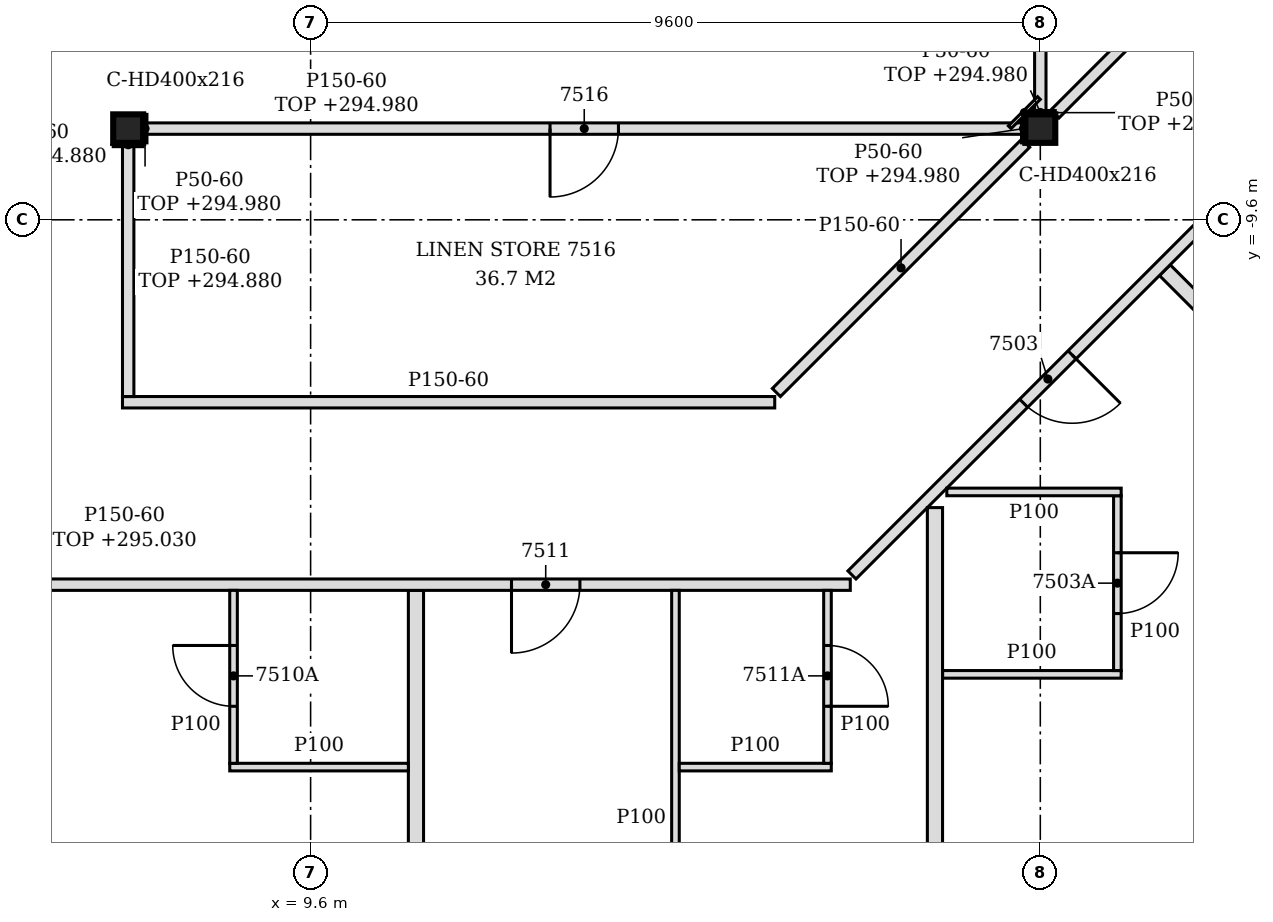
"""IFC4 building model, lengths in metres.
Left out: names, types, materials, properties, quantities, classifications, styles, units other than length and angle.
Written with IfcOpenShell. Run it as: python <this file> out.ifc"""

import sys

from ifc_helpers import new_model, si_unit, direction, frame, frame_2d, origin, origin_2d, place, context, subcontext, project, spatial, polyline, rectangle, i_section, outline, extrude, element, fill, save


model = new_model("IFC4")
c1 = context("Model", 3, precision=1e-05, world=origin(), true_north=direction((0.0, 1.0)))
c2 = subcontext(c1, "Body", "Model", "MODEL_VIEW")
j1 = project(units=[si_unit("LENGTHUNIT", "METRE"), si_unit("PLANEANGLEUNIT", "RADIAN")], contexts=[c1])
p1 = place(None, origin())
s1 = spatial("IfcSite", under=j1, at=p1, CompositionType="ELEMENT")
p2 = place(p1, origin())
s2 = spatial("IfcBuilding", under=s1, at=p2, CompositionType="ELEMENT")
p3 = place(p2, frame((0.0, 0.0, 292.2)))
s3 = spatial("IfcBuildingStorey", under=s2, at=p3, CompositionType="ELEMENT", Elevation=292.2)
for number, where, z_axis, x_axis in (
    (1, (7.2, -8.4, -0.15), (0.0, 0.0, 1.0), (1.0, 0.0, 0.0)),
    (2, (19.2, -8.4, -0.15), (0.0, 0.0, 1.0), (1.0, 0.0, 0.0)),
):
    element("IfcColumn", number, at=place(p3, frame(where, z_axis=z_axis, x_axis=x_axis)), inside=s3, PredefinedType="COLUMN", context=c2, shape_type="SweptSolid", body=[
        extrude(i_section(OverallWidth=0.394, OverallDepth=0.375, WebThickness=0.017, FlangeThickness=0.028, FilletRadius=0.015, at=origin_2d()), origin(), (0.0, 0.0, 1.0), 3.55),
    ])
p4 = place(p3, frame((10.986, -23.703, 0.0), z_axis=(0.0, 0.0, 1.0), x_axis=(0.0, 1.0, 0.0)))
e3 = element("IfcWall", 3, at=p4, inside=s3, PredefinedType="PARTITIONING", context=c2, shape_type="SweptSolid", body=[
    extrude(outline(polyline([(0.0, 0.0), (9.228, 0.0), (9.228, 2.83), (9.198, 2.83), (9.196, 3.4), (4.608, 3.4), (4.606, 2.83), (4.398, 2.83), (4.396, 3.4), (0.753, 3.4), (0.751, 2.88), (0.453, 2.88), (0.451, 3.4), (0.0, 3.4), (0.0, 0.0)])), frame((0.0, 0.1, 0.0), z_axis=(0.0, -1.0, 0.0), x_axis=(1.0, 0.0, 0.0)), (0.0, 0.0, 1.0), 0.2),
])
p5 = place(p3, frame((17.814, -23.703, 0.0), z_axis=(0.0, 0.0, 1.0), x_axis=(0.0, 1.0, 0.0)))
e4 = element("IfcWall", 4, at=p5, inside=s3, PredefinedType="PARTITIONING", context=c2, shape_type="SweptSolid", body=[
    extrude(outline(polyline([(0.0, 0.0), (10.317, 0.0), (10.317, 3.4), (9.408, 3.4), (9.406, 2.83), (9.198, 2.83), (9.196, 3.4), (4.608, 3.4), (4.606, 2.83), (4.398, 2.83), (4.396, 3.4), (0.753, 3.4), (0.751, 2.88), (0.453, 2.88), (0.451, 3.4), (0.0, 3.4), (0.0, 0.0)])), frame((0.0, 0.1, 0.0), z_axis=(0.0, -1.0, 0.0), x_axis=(1.0, 0.0, 0.0)), (0.0, 0.0, 1.0), 0.2),
])
p6 = place(p3, frame((14.4, -22.916, 0.0), z_axis=(0.0, 0.0, 1.0), x_axis=(0.0, 1.0, 0.0)))
e5 = element("IfcWall", 5, at=p6, inside=s3, PredefinedType="PARTITIONING", context=c2, shape_type="SweptSolid", body=[
    extrude(outline(polyline([(0.0, 0.0), (8.441, 0.0), (8.441, 2.83), (8.411, 2.83), (8.409, 3.4), (3.821, 3.4), (3.819, 2.83), (3.611, 2.83), (3.609, 3.4), (0.0, 3.4), (0.0, 0.0)])), frame((0.0, 0.05, 0.0), z_axis=(0.0, -1.0, 0.0), x_axis=(1.0, 0.0, 0.0)), (0.0, 0.0, 1.0), 0.1),
])
p7 = place(p6, frame((2.066, 0.0, 0.0)))
e6 = element("IfcOpeningElement", 6, at=p7, cuts=e5, PredefinedType="OPENING", context=c2, shape_type="SweptSolid", body=[
    extrude(rectangle(XDim=0.9, YDim=2.1, at=frame_2d((0.45, 1.05))), frame((0.0, 0.06, 0.0), z_axis=(0.0, -1.0, 0.0), x_axis=(1.0, 0.0, 0.0)), (0.0, 0.0, 1.0), 0.12),
])
p8 = place(p3, frame((8.536, -16.8, 0.0), z_axis=(0.0, 0.0, 1.0), x_axis=(1.0, 0.0, 0.0)))
e7 = element("IfcWall", 7, at=p8, inside=s3, PredefinedType="PARTITIONING", context=c2, shape_type="SweptSolid", body=[
    extrude(rectangle(XDim=2.35, YDim=0.1, at=frame_2d((1.175, 0.0))), origin(), (0.0, 0.0, 1.0), 3.4),
])
p9 = place(p3, frame((8.586, -16.75, 0.0), z_axis=(0.0, 0.0, 1.0), x_axis=(0.0, 1.0, 0.0)))
e8 = element("IfcWall", 8, at=p9, inside=s3, PredefinedType="PARTITIONING", context=c2, shape_type="SweptSolid", body=[
    extrude(outline(polyline([(0.0, 0.0), (2.275, 0.0), (2.275, 2.83), (2.245, 2.83), (2.243, 3.4), (0.0, 3.4), (0.0, 0.0)])), frame((0.0, 0.05, 0.0), z_axis=(0.0, -1.0, 0.0), x_axis=(1.0, 0.0, 0.0)), (0.0, 0.0, 1.0), 0.1),
])
p10 = place(p9, frame((0.75, 0.0, 0.0)))
e9 = element("IfcOpeningElement", 9, at=p10, cuts=e8, PredefinedType="OPENING", context=c2, shape_type="SweptSolid", body=[
    extrude(rectangle(XDim=0.8, YDim=2.1, at=frame_2d((0.4, 1.05))), frame((0.0, 0.06, 0.0), z_axis=(0.0, -1.0, 0.0), x_axis=(1.0, 0.0, 0.0)), (0.0, 0.0, 1.0), 0.12),
])
p11 = place(p3, frame((14.45, -16.8, 0.0), z_axis=(0.0, 0.0, 1.0), x_axis=(1.0, 0.0, 0.0)))
e10 = element("IfcWall", 10, at=p11, inside=s3, PredefinedType="PARTITIONING", context=c2, shape_type="SweptSolid", body=[
    extrude(rectangle(XDim=2.0, YDim=0.1, at=frame_2d((1.0, 0.0))), origin(), (0.0, 0.0, 1.0), 3.4),
])
p12 = place(p3, frame((16.4, -16.75, 0.0), z_axis=(0.0, 0.0, 1.0), x_axis=(0.0, 1.0, 0.0)))
e11 = element("IfcWall", 11, at=p12, inside=s3, PredefinedType="PARTITIONING", context=c2, shape_type="SweptSolid", body=[
    extrude(outline(polyline([(0.0, 0.0), (2.275, 0.0), (2.275, 2.83), (2.245, 2.83), (2.243, 3.4), (0.0, 3.4), (0.0, 0.0)])), frame((0.0, 0.05, 0.0), z_axis=(0.0, -1.0, 0.0), x_axis=(1.0, 0.0, 0.0)), (0.0, 0.0, 1.0), 0.1),
])
p13 = place(p12, frame((0.75, 0.0, 0.0)))
e12 = element("IfcOpeningElement", 12, at=p13, cuts=e11, PredefinedType="OPENING", context=c2, shape_type="SweptSolid", body=[
    extrude(rectangle(XDim=0.8, YDim=2.1, at=frame_2d((0.4, 1.05))), frame((0.0, 0.06, 0.0), z_axis=(0.0, -1.0, 0.0), x_axis=(1.0, 0.0, 0.0)), (0.0, 0.0, 1.0), 0.12),
])
p14 = place(p3, frame((27.262, -16.686, 0.0), z_axis=(0.0, 0.0, 1.0), x_axis=(-0.707106781187, 0.707106781187, 0.0)))
e13 = element("IfcWall", 13, at=p14, inside=s3, PredefinedType="PARTITIONING", context=c2, shape_type="SweptSolid", body=[
    extrude(rectangle(XDim=9.085, YDim=0.2, at=frame_2d((4.542, 0.0))), origin(), (0.0, 0.0, 1.0), 2.88),
])
p15 = place(p3, frame((17.914, -15.58, 0.0), z_axis=(0.0, 0.0, 1.0), x_axis=(1.0, 0.0, 0.0)))
e14 = element("IfcWall", 14, at=p15, inside=s3, PredefinedType="PARTITIONING", context=c2, shape_type="SweptSolid", body=[
    extrude(outline(polyline([(0.0, 0.0), (2.35, 0.0), (2.35, 3.4), (1.436, 3.4), (1.434, 2.68), (1.136, 2.68), (1.134, 3.4), (0.0, 3.4), (0.0, 0.0)])), frame((0.0, 0.05, 0.0), z_axis=(0.0, -1.0, 0.0), x_axis=(1.0, 0.0, 0.0)), (0.0, 0.0, 1.0), 0.1),
])
p16 = place(p3, frame((20.214, -15.53, 0.0), z_axis=(0.0, 0.0, 1.0), x_axis=(0.0, 1.0, 0.0)))
e15 = element("IfcWall", 15, at=p16, inside=s3, PredefinedType="PARTITIONING", context=c2, shape_type="SweptSolid", body=[
    extrude(outline(polyline([(0.0, 0.0), (2.3, 0.0), (2.3, 3.4), (1.23, 3.4), (1.228, 2.88), (1.03, 2.88), (1.028, 3.4), (0.0, 3.4), (0.0, 0.0)])), frame((0.0, 0.05, 0.0), z_axis=(0.0, -1.0, 0.0), x_axis=(1.0, 0.0, 0.0)), (0.0, 0.0, 1.0), 0.1),
])
p17 = place(p16, frame((0.75, 0.0, 0.0)))
e16 = element("IfcOpeningElement", 16, at=p17, cuts=e15, PredefinedType="OPENING", context=c2, shape_type="SweptSolid", body=[
    extrude(rectangle(XDim=0.8, YDim=2.1, at=frame_2d((0.4, 1.05))), frame((0.0, 0.06, 0.0), z_axis=(0.0, -1.0, 0.0), x_axis=(1.0, 0.0, 0.0)), (0.0, 0.0, 1.0), 0.12),
])
p18 = place(p3, frame((-1.926, -14.4, 0.0), z_axis=(0.0, 0.0, 1.0), x_axis=(1.0, 0.0, 0.0)))
e17 = element("IfcWall", 17, at=p18, inside=s3, PredefinedType="PARTITIONING", context=c2, shape_type="SweptSolid", body=[
    extrude(outline(polyline([(0.0, 0.0), (18.626, 0.0), (18.626, 2.83), (9.276, 2.83), (9.274, 2.68), (8.976, 2.68), (8.974, 2.83), (1.369, 2.83), (1.367, 2.58), (0.229, 2.58), (0.227, 2.83), (0.0, 2.83), (0.0, 0.0)])), frame((0.0, 0.075, 0.0), z_axis=(0.0, -1.0, 0.0), x_axis=(1.0, 0.0, 0.0)), (0.0, 0.0, 1.0), 0.15),
])
p19 = place(p18, frame((4.569, 0.0, 0.0)))
e18 = element("IfcOpeningElement", 18, at=p19, cuts=e17, PredefinedType="OPENING", context=c2, shape_type="SweptSolid", body=[
    extrude(rectangle(XDim=0.9, YDim=2.1, at=frame_2d((0.45, 1.05))), frame((0.0, 0.085, 0.0), z_axis=(0.0, -1.0, 0.0), x_axis=(1.0, 0.0, 0.0)), (0.0, 0.0, 1.0), 0.17),
])
p20 = place(p18, frame((14.169, 0.0, 0.0)))
e19 = element("IfcOpeningElement", 19, at=p20, cuts=e17, PredefinedType="OPENING", context=c2, shape_type="SweptSolid", body=[
    extrude(rectangle(XDim=0.9, YDim=2.1, at=frame_2d((0.45, 1.05))), frame((0.0, 0.085, 0.0), z_axis=(0.0, -1.0, 0.0), x_axis=(1.0, 0.0, 0.0)), (0.0, 0.0, 1.0), 0.17),
])
p21 = place(p3, frame((16.722, -14.272, 0.0), z_axis=(0.0, 0.0, 1.0), x_axis=(0.707106781187, 0.707106781187, 0.0)))
e20 = element("IfcWall", 20, at=p21, inside=s3, PredefinedType="PARTITIONING", context=c2, shape_type="SweptSolid", body=[
    extrude(rectangle(XDim=20.058, YDim=0.15, at=frame_2d((10.029, 0.0))), origin(), (0.0, 0.0, 1.0), 2.68),
])
p22 = place(p21, frame((3.195, 0.0, 0.0)))
e21 = element("IfcOpeningElement", 21, at=p22, cuts=e20, PredefinedType="OPENING", context=c2, shape_type="SweptSolid", body=[
    extrude(rectangle(XDim=0.9, YDim=2.1, at=frame_2d((0.45, 1.05))), frame((0.0, 0.085, 0.0), z_axis=(0.0, -1.0, 0.0), x_axis=(1.0, 0.0, 0.0)), (0.0, 0.0, 1.0), 0.17),
])
p23 = place(p21, frame((9.193, 0.0, 0.0)))
e22 = element("IfcOpeningElement", 22, at=p23, cuts=e20, PredefinedType="OPENING", context=c2, shape_type="SweptSolid", body=[
    extrude(rectangle(XDim=0.9, YDim=2.1, at=frame_2d((0.45, 1.05))), frame((0.0, 0.085, 0.0), z_axis=(0.0, -1.0, 0.0), x_axis=(1.0, 0.0, 0.0)), (0.0, 0.0, 1.0), 0.17),
])
p24 = place(p21, frame((17.613, 0.0, 0.0)))
e23 = element("IfcOpeningElement", 23, at=p24, cuts=e20, PredefinedType="OPENING", context=c2, shape_type="SweptSolid", body=[
    extrude(rectangle(XDim=0.9, YDim=2.1, at=frame_2d((0.45, 1.05))), frame((0.0, 0.085, 0.0), z_axis=(0.0, -1.0, 0.0), x_axis=(1.0, 0.0, 0.0)), (0.0, 0.0, 1.0), 0.17),
])
p25 = place(p3, frame((17.97, -13.18, 0.0), z_axis=(0.0, 0.0, 1.0), x_axis=(1.0, 0.0, 0.0)))
e24 = element("IfcWall", 24, at=p25, inside=s3, PredefinedType="PARTITIONING", context=c2, shape_type="SweptSolid", body=[
    extrude(outline(polyline([(0.0, 0.0), (2.294, 0.0), (2.294, 3.4), (1.38, 3.4), (1.378, 2.68), (1.08, 2.68), (1.078, 3.4), (0.0, 3.4), (0.0, 0.0)])), frame((0.0, 0.05, 0.0), z_axis=(0.0, -1.0, 0.0), x_axis=(1.0, 0.0, 0.0)), (0.0, 0.0, 1.0), 0.1),
])
p26 = place(p3, frame((7.125, -12.0, 0.0), z_axis=(0.0, 0.0, 1.0), x_axis=(1.0, 0.0, 0.0)))
e25 = element("IfcWall", 25, at=p26, inside=s3, PredefinedType="PARTITIONING", context=c2, shape_type="SweptSolid", body=[
    extrude(outline(polyline([(0.0, 0.0), (8.581, 0.0), (8.581, 3.4), (0.225, 3.4), (0.223, 2.68), (0.0, 2.68), (0.0, 0.0)])), frame((0.0, 0.075, 0.0), z_axis=(0.0, -1.0, 0.0), x_axis=(1.0, 0.0, 0.0)), (0.0, 0.0, 1.0), 0.15),
])
p27 = place(p3, frame((7.2, -11.925, 0.0), z_axis=(0.0, 0.0, 1.0), x_axis=(0.0, 1.0, 0.0)))
e26 = element("IfcWall", 26, at=p27, inside=s3, PredefinedType="PARTITIONING", context=c2, shape_type="SweptSolid", body=[
    extrude(rectangle(XDim=3.338, YDim=0.15, at=frame_2d((1.669, 0.0))), origin(), (0.0, 0.0, 1.0), 2.68),
])
p28 = place(p3, frame((15.728, -11.872, 0.0), z_axis=(0.0, 0.0, 1.0), x_axis=(0.707106781187, 0.707106781187, 0.0)))
e27 = element("IfcWall", 27, at=p28, inside=s3, PredefinedType="PARTITIONING", context=c2, shape_type="SweptSolid", body=[
    extrude(rectangle(XDim=4.638, YDim=0.15, at=frame_2d((2.319, 0.0))), origin(), (0.0, 0.0, 1.0), 3.4),
])
p29 = place(p3, frame((7.397, -8.4, 0.0), z_axis=(0.0, 0.0, 1.0), x_axis=(1.0, 0.0, 0.0)))
e28 = element("IfcWall", 28, at=p29, inside=s3, PredefinedType="PARTITIONING", context=c2, shape_type="SweptSolid", body=[
    extrude(rectangle(XDim=11.606, YDim=0.15, at=frame_2d((5.803, 0.0))), origin(), (0.0, 0.0, 1.0), 2.78),
])
p30 = place(p29, frame((5.353, 0.0, 0.0)))
e29 = element("IfcOpeningElement", 29, at=p30, cuts=e28, PredefinedType="OPENING", context=c2, shape_type="SweptSolid", body=[
    extrude(rectangle(XDim=0.9, YDim=2.1, at=frame_2d((0.45, 1.05))), frame((0.0, 0.085, 0.0), z_axis=(0.0, -1.0, 0.0), x_axis=(1.0, 0.0, 0.0)), (0.0, 0.0, 1.0), 0.17),
])
p31 = place(p3, frame((19.2, -8.212, 0.0), z_axis=(0.0, 0.0, 1.0), x_axis=(0.0, 1.0, 0.0)))
e30 = element("IfcWall", 30, at=p31, inside=s3, PredefinedType="PARTITIONING", context=c2, shape_type="SweptSolid", body=[
    extrude(rectangle(XDim=9.337, YDim=0.15, at=frame_2d((4.669, 0.0))), origin(), (0.0, 0.0, 1.0), 2.78),
])
p32 = place(p31, frame((7.213, 0.0, 0.0)))
e31 = element("IfcOpeningElement", 31, at=p32, cuts=e30, PredefinedType="OPENING", context=c2, shape_type="SweptSolid", body=[
    extrude(rectangle(XDim=0.8, YDim=2.1, at=frame_2d((0.4, 1.05))), frame((0.0, 0.085, 0.0), z_axis=(0.0, -1.0, 0.0), x_axis=(1.0, 0.0, 0.0)), (0.0, 0.0, 1.0), 0.17),
])
p33 = place(p3, frame((19.392, -8.208, 0.0), z_axis=(0.0, 0.0, 1.0), x_axis=(0.707106781187, 0.707106781187, 0.0)))
e32 = element("IfcWall", 32, at=p33, inside=s3, PredefinedType="PARTITIONING", context=c2, shape_type="SweptSolid", body=[
    extrude(rectangle(XDim=13.124, YDim=0.15, at=frame_2d((6.562, 0.0))), origin(), (0.0, 0.0, 1.0), 2.83),
])
p34 = place(p33, frame((6.066, 0.0, 0.0)))
e33 = element("IfcOpeningElement", 33, at=p34, cuts=e32, PredefinedType="OPENING", context=c2, shape_type="SweptSolid", body=[
    extrude(rectangle(XDim=0.9, YDim=2.1, at=frame_2d((0.45, 1.05))), frame((0.0, 0.085, 0.0), z_axis=(0.0, -1.0, 0.0), x_axis=(1.0, 0.0, 0.0)), (0.0, 0.0, 1.0), 0.17),
])
p35 = place(p3, frame((7.422, -8.587, 0.0), z_axis=(0.0, 0.0, 1.0), x_axis=(0.0, 1.0, 0.0)))
e34 = element("IfcWall", 34, at=p35, inside=s3, PredefinedType="PARTITIONING", context=c2, shape_type="SweptSolid", body=[
    extrude(rectangle(XDim=0.375, YDim=0.05, at=frame_2d((0.188, 0.0))), origin(), (0.0, 0.0, 1.0), 2.78),
])
p36 = place(p3, frame((18.798, -8.382, 0.0), z_axis=(0.0, 0.0, 1.0), x_axis=(0.707106781187, 0.707106781187, 0.0)))
e35 = element("IfcWall", 35, at=p36, inside=s3, PredefinedType="PARTITIONING", context=c2, shape_type="SweptSolid", body=[
    extrude(rectangle(XDim=0.544, YDim=0.05, at=frame_2d((0.272, 0.0))), origin(), (0.0, 0.0, 1.0), 2.78),
])
p37 = place(p3, frame((7.003, -8.613, 0.0), z_axis=(0.0, 0.0, 1.0), x_axis=(1.0, 0.0, 0.0)))
e36 = element("IfcWall", 36, at=p37, inside=s3, PredefinedType="PARTITIONING", context=c2, shape_type="SweptSolid", body=[
    extrude(rectangle(XDim=0.394, YDim=0.05, at=frame_2d((0.197, 0.0))), origin(), (0.0, 0.0, 1.0), 2.68),
])
p38 = place(p3, frame((19.003, -8.188, 0.0), z_axis=(0.0, 0.0, 1.0), x_axis=(1.0, 0.0, 0.0)))
e37 = element("IfcWall", 37, at=p38, inside=s3, PredefinedType="PARTITIONING", context=c2, shape_type="SweptSolid", body=[
    extrude(rectangle(XDim=0.394, YDim=0.05, at=frame_2d((0.197, 0.0))), origin(), (0.0, 0.0, 1.0), 2.78),
])
p39 = place(p3, frame((18.978, -8.587, 0.0), z_axis=(0.0, 0.0, 1.0), x_axis=(0.0, 1.0, 0.0)))
e38 = element("IfcWall", 38, at=p39, inside=s3, PredefinedType="PARTITIONING", context=c2, shape_type="SweptSolid", body=[
    extrude(rectangle(XDim=0.375, YDim=0.05, at=frame_2d((0.188, 0.0))), origin(), (0.0, 0.0, 1.0), 2.78),
])
p40 = place(p22, frame((0.9, 0.0, 0.0), z_axis=(0.0, 0.0, 1.0), x_axis=(-1.0, 0.0, 0.0)))
e39 = element("IfcDoor", 39, at=p40, inside=s3, OperationType="SINGLE_SWING_LEFT", PredefinedType="DOOR", context=c2, shape_type="SweptSolid", body=[
    extrude(rectangle(XDim=0.9, YDim=2.1, at=frame_2d((0.45, 1.05))), frame((0.0, 0.025, 0.0), z_axis=(0.0, -1.0, 0.0), x_axis=(1.0, 0.0, 0.0)), (0.0, 0.0, 1.0), 0.05),
])
fill(e21, e39)
p41 = place(p17, frame((0.8, 0.0, 0.0), z_axis=(0.0, 0.0, 1.0), x_axis=(-1.0, 0.0, 0.0)))
e40 = element("IfcDoor", 40, at=p41, inside=s3, OperationType="SINGLE_SWING_LEFT", PredefinedType="DOOR", context=c2, shape_type="SweptSolid", body=[
    extrude(rectangle(XDim=0.8, YDim=2.1, at=frame_2d((0.4, 1.05))), frame((0.0, 0.025, 0.0), z_axis=(0.0, -1.0, 0.0), x_axis=(1.0, 0.0, 0.0)), (0.0, 0.0, 1.0), 0.05),
])
fill(e16, e40)
p42 = place(p10, origin())
e41 = element("IfcDoor", 41, at=p42, inside=s3, OperationType="SINGLE_SWING_RIGHT", PredefinedType="DOOR", context=c2, shape_type="SweptSolid", body=[
    extrude(rectangle(XDim=0.8, YDim=2.1, at=frame_2d((0.4, 1.05))), frame((0.0, 0.025, 0.0), z_axis=(0.0, -1.0, 0.0), x_axis=(1.0, 0.0, 0.0)), (0.0, 0.0, 1.0), 0.05),
])
fill(e9, e41)
p43 = place(p20, frame((0.9, 0.0, 0.0), z_axis=(0.0, 0.0, 1.0), x_axis=(-1.0, 0.0, 0.0)))
e42 = element("IfcDoor", 42, at=p43, inside=s3, OperationType="SINGLE_SWING_RIGHT", PredefinedType="DOOR", context=c2, shape_type="SweptSolid", body=[
    extrude(rectangle(XDim=0.9, YDim=2.1, at=frame_2d((0.45, 1.05))), frame((0.0, 0.025, 0.0), z_axis=(0.0, -1.0, 0.0), x_axis=(1.0, 0.0, 0.0)), (0.0, 0.0, 1.0), 0.05),
])
fill(e19, e42)
p44 = place(p13, frame((0.8, 0.0, 0.0), z_axis=(0.0, 0.0, 1.0), x_axis=(-1.0, 0.0, 0.0)))
e43 = element("IfcDoor", 43, at=p44, inside=s3, OperationType="SINGLE_SWING_RIGHT", PredefinedType="DOOR", context=c2, shape_type="SweptSolid", body=[
    extrude(rectangle(XDim=0.8, YDim=2.1, at=frame_2d((0.4, 1.05))), frame((0.0, 0.025, 0.0), z_axis=(0.0, -1.0, 0.0), x_axis=(1.0, 0.0, 0.0)), (0.0, 0.0, 1.0), 0.05),
])
fill(e12, e43)
p45 = place(p30, frame((0.9, 0.0, 0.0), z_axis=(0.0, 0.0, 1.0), x_axis=(-1.0, 0.0, 0.0)))
e44 = element("IfcDoor", 44, at=p45, inside=s3, OperationType="SINGLE_SWING_RIGHT", PredefinedType="DOOR", context=c2, shape_type="SweptSolid", body=[
    extrude(rectangle(XDim=0.9, YDim=2.1, at=frame_2d((0.45, 1.05))), frame((0.0, 0.025, 0.0), z_axis=(0.0, -1.0, 0.0), x_axis=(1.0, 0.0, 0.0)), (0.0, 0.0, 1.0), 0.05),
])
fill(e29, e44)
save(model, sys.argv[1])
